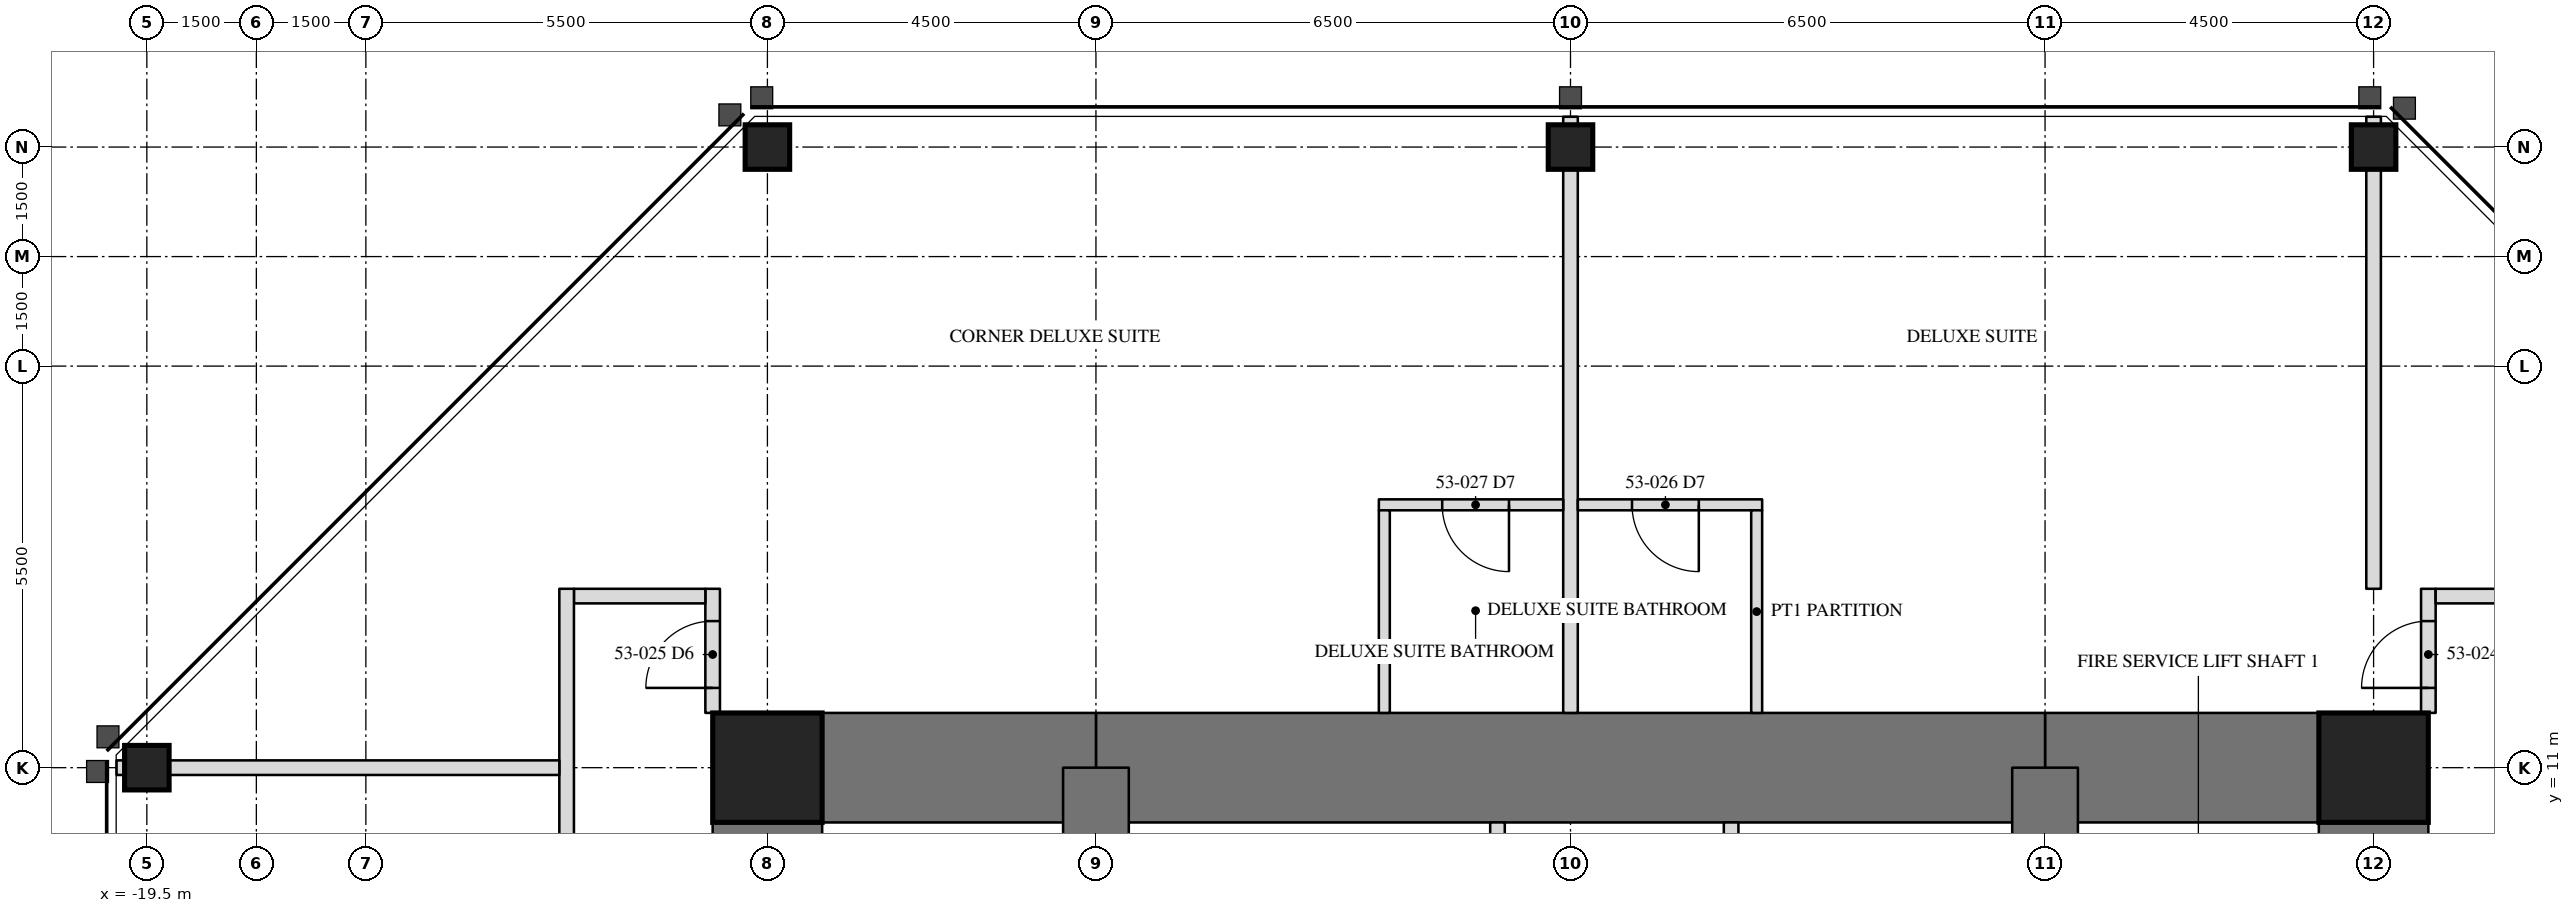
"""IFC4 building model, lengths in metres.
Left out: names, types, materials, properties, quantities, classifications, styles, units other than length and angle.
Written with IfcOpenShell. Run it as: python <this file> out.ifc"""

import sys

from ifc_helpers import new_model, si_unit, direction, frame, frame_2d, origin, origin_2d, place, context, subcontext, project, spatial, rectangle, hollow_rectangle, extrude, element, fill, save


model = new_model("IFC4")
c1 = context("Model", 3, precision=1e-05, world=origin(), true_north=direction((0.0, 1.0)))
c2 = subcontext(c1, "Body", "Model", "MODEL_VIEW")
j1 = project(units=[si_unit("LENGTHUNIT", "METRE"), si_unit("PLANEANGLEUNIT", "RADIAN")], contexts=[c1])
p1 = place(None, origin())
s1 = spatial("IfcSite", under=j1, at=p1, CompositionType="ELEMENT")
p2 = place(p1, origin())
s2 = spatial("IfcBuilding", under=s1, at=p2, CompositionType="ELEMENT")
p3 = place(p2, frame((0.0, 0.0, 222.2)))
s3 = spatial("IfcBuildingStorey", under=s2, at=p3, CompositionType="ELEMENT", Elevation=222.2)
for number, where, z_axis, x_axis in (
    (1, (11.0, 19.5, 0.0), (0.0, 0.0, 1.0), (1.0, 0.0, 0.0)),
    (2, (0.0, 19.5, 0.0), (0.0, 0.0, 1.0), (1.0, 0.0, 0.0)),
    (3, (-11.0, 19.5, 0.0), (0.0, 0.0, 1.0), (1.0, 0.0, 0.0)),
    (4, (-19.5, 11.0, 0.0), (0.0, 0.0, 1.0), (0.0, 1.0, 0.0)),
):
    element("IfcColumn", number, at=place(p3, frame(where, z_axis=z_axis, x_axis=x_axis)), inside=s3, PredefinedType="COLUMN", context=c2, shape_type="SweptSolid", body=[
        extrude(hollow_rectangle(XDim=0.61, YDim=0.61, WallThickness=0.076, at=origin_2d()), origin(), (0.0, 0.0, 1.0), 3.5),
    ])
p4 = place(p3, frame((11.0, -11.0, 0.0), z_axis=(0.0, 0.0, 1.0), x_axis=(0.0, 1.0, 0.0)))
e5 = element("IfcWall", 5, at=p4, inside=s3, PredefinedType="SHEAR", context=c2, shape_type="SweptSolid", body=[
    extrude(rectangle(XDim=22.0, YDim=1.5, at=frame_2d((11.0, 0.0))), origin(), (0.0, 0.0, 1.0), 3.5),
])
p5 = place(p4, frame((15.393, 0.0, 0.0)))
e6 = element("IfcOpeningElement", 6, at=p5, cuts=e5, PredefinedType="OPENING", context=c2, shape_type="SweptSolid", body=[
    extrude(rectangle(XDim=0.915, YDim=2.134, at=frame_2d((0.458, 1.067))), frame((0.0, 0.76, 0.0), z_axis=(0.0, -1.0, 0.0), x_axis=(1.0, 0.0, 0.0)), (0.0, 0.0, 1.0), 1.52),
])
p6 = place(p3, frame((-11.0, 11.0, 0.0), z_axis=(0.0, 0.0, 1.0), x_axis=(0.0, -1.0, 0.0)))
e7 = element("IfcWall", 7, at=p6, inside=s3, PredefinedType="SHEAR", context=c2, shape_type="SweptSolid", body=[
    extrude(rectangle(XDim=22.0, YDim=1.5, at=frame_2d((11.0, 0.0))), origin(), (0.0, 0.0, 1.0), 3.5),
])
p7 = place(p6, frame((15.393, 0.0, 0.0)))
e8 = element("IfcOpeningElement", 8, at=p7, cuts=e7, PredefinedType="OPENING", context=c2, shape_type="SweptSolid", body=[
    extrude(rectangle(XDim=0.915, YDim=2.134, at=frame_2d((0.458, 1.067))), frame((0.0, 0.76, 0.0), z_axis=(0.0, -1.0, 0.0), x_axis=(1.0, 0.0, 0.0)), (0.0, 0.0, 1.0), 1.52),
])
p8 = place(p3, frame((11.0, 11.0, 0.0), z_axis=(0.0, 0.0, 1.0), x_axis=(-1.0, 0.0, 0.0)))
e9 = element("IfcWall", 9, at=p8, inside=s3, PredefinedType="SHEAR", context=c2, shape_type="SweptSolid", body=[
    extrude(rectangle(XDim=4.5, YDim=1.5, at=frame_2d((2.25, 0.0))), origin(), (0.0, 0.0, 1.0), 3.5),
])
p9 = place(p3, frame((6.5, 11.0, 0.0), z_axis=(0.0, 0.0, 1.0), x_axis=(-1.0, 0.0, 0.0)))
e10 = element("IfcWall", 10, at=p9, inside=s3, PredefinedType="SHEAR", context=c2, shape_type="SweptSolid", body=[
    extrude(rectangle(XDim=13.0, YDim=1.5, at=frame_2d((6.5, 0.0))), origin(), (0.0, 0.0, 1.0), 3.5),
])
p10 = place(p3, frame((-6.5, 11.0, 0.0), z_axis=(0.0, 0.0, 1.0), x_axis=(-1.0, 0.0, 0.0)))
e11 = element("IfcWall", 11, at=p10, inside=s3, PredefinedType="SHEAR", context=c2, shape_type="SweptSolid", body=[
    extrude(rectangle(XDim=4.5, YDim=1.5, at=frame_2d((2.25, 0.0))), origin(), (0.0, 0.0, 1.0), 3.5),
])
for number, where, z_axis, x_axis in (
    (12, (6.5, 6.5, 0.0), (0.0, 0.0, 1.0), (0.0, 1.0, 0.0)),
    (13, (-6.5, 11.0, 0.0), (0.0, 0.0, 1.0), (0.0, -1.0, 0.0)),
):
    element("IfcWall", number, at=place(p3, frame(where, z_axis=z_axis, x_axis=x_axis)), inside=s3, PredefinedType="SHEAR", context=c2, shape_type="SweptSolid", body=[
        extrude(rectangle(XDim=4.5, YDim=0.9, at=frame_2d((2.25, 0.0))), origin(), (0.0, 0.0, 1.0), 3.5),
    ])
for number, where, z_axis, x_axis in (
    (14, (11.0, 11.0, 0.0), (0.0, 0.0, 1.0), (1.0, 0.0, 0.0)),
    (15, (-11.0, 11.0, 0.0), (0.0, 0.0, 1.0), (1.0, 0.0, 0.0)),
):
    element("IfcColumn", number, at=place(p3, frame(where, z_axis=z_axis, x_axis=x_axis)), inside=s3, PredefinedType="COLUMN", context=c2, shape_type="SweptSolid", body=[
        extrude(hollow_rectangle(XDim=1.499, YDim=1.499, WallThickness=0.102, at=origin_2d()), origin(), (0.0, 0.0, 1.0), 3.5),
    ])
p11 = place(p3, frame((-1.0, 6.95, 0.0), z_axis=(0.0, 0.0, 1.0), x_axis=(0.0, 1.0, 0.0)))
e16 = element("IfcWall", 16, at=p11, inside=s3, PredefinedType="PARTITIONING", context=c2, shape_type="SweptSolid", body=[
    extrude(rectangle(XDim=3.3, YDim=0.2, at=frame_2d((1.65, 0.0))), origin(), (0.0, 0.0, 1.0), 3.31),
])
p12 = place(p11, frame((1.192, 0.0, 0.0)))
e17 = element("IfcOpeningElement", 17, at=p12, cuts=e16, PredefinedType="OPENING", context=c2, shape_type="SweptSolid", body=[
    extrude(rectangle(XDim=0.915, YDim=2.134, at=frame_2d((0.458, 1.067))), frame((0.0, 0.11, 0.0), z_axis=(0.0, -1.0, 0.0), x_axis=(1.0, 0.0, 0.0)), (0.0, 0.0, 1.0), 0.22),
])
p13 = place(p3, frame((2.2, 6.95, 0.0), z_axis=(0.0, 0.0, 1.0), x_axis=(0.0, 1.0, 0.0)))
e18 = element("IfcWall", 18, at=p13, inside=s3, PredefinedType="PARTITIONING", context=c2, shape_type="SweptSolid", body=[
    extrude(rectangle(XDim=3.3, YDim=0.2, at=frame_2d((1.65, 0.0))), origin(), (0.0, 0.0, 1.0), 3.31),
])
p14 = place(p13, frame((1.192, 0.0, 0.0)))
e19 = element("IfcOpeningElement", 19, at=p14, cuts=e18, PredefinedType="OPENING", context=c2, shape_type="SweptSolid", body=[
    extrude(rectangle(XDim=0.915, YDim=2.134, at=frame_2d((0.458, 1.067))), frame((0.0, 0.11, 0.0), z_axis=(0.0, -1.0, 0.0), x_axis=(1.0, 0.0, 0.0)), (0.0, 0.0, 1.0), 0.22),
])
p15 = place(p3, frame((11.75, 11.75, 0.0), z_axis=(0.0, 0.0, 1.0), x_axis=(0.0, 1.0, 0.0)))
e20 = element("IfcWall", 20, at=p15, inside=s3, PredefinedType="PARTITIONING", context=c2, shape_type="SweptSolid", body=[
    extrude(rectangle(XDim=1.7, YDim=0.2, at=frame_2d((0.85, 0.0))), origin(), (0.0, 0.0, 1.0), 3.31),
])
p16 = place(p15, frame((0.343, 0.0, 0.0)))
e21 = element("IfcOpeningElement", 21, at=p16, cuts=e20, PredefinedType="OPENING", context=c2, shape_type="SweptSolid", body=[
    extrude(rectangle(XDim=0.915, YDim=2.134, at=frame_2d((0.458, 1.067))), frame((0.0, 0.11, 0.0), z_axis=(0.0, -1.0, 0.0), x_axis=(1.0, 0.0, 0.0)), (0.0, 0.0, 1.0), 0.22),
])
p17 = place(p3, frame((-11.75, 11.75, 0.0), z_axis=(0.0, 0.0, 1.0), x_axis=(0.0, 1.0, 0.0)))
e22 = element("IfcWall", 22, at=p17, inside=s3, PredefinedType="PARTITIONING", context=c2, shape_type="SweptSolid", body=[
    extrude(rectangle(XDim=1.7, YDim=0.2, at=frame_2d((0.85, 0.0))), origin(), (0.0, 0.0, 1.0), 3.31),
])
p18 = place(p17, frame((0.343, 0.0, 0.0)))
e23 = element("IfcOpeningElement", 23, at=p18, cuts=e22, PredefinedType="OPENING", context=c2, shape_type="SweptSolid", body=[
    extrude(rectangle(XDim=0.915, YDim=2.134, at=frame_2d((0.458, 1.067))), frame((0.0, 0.11, 0.0), z_axis=(0.0, -1.0, 0.0), x_axis=(1.0, 0.0, 0.0)), (0.0, 0.0, 1.0), 0.22),
])
p19 = place(p3, frame((13.85, 13.35, 0.0), z_axis=(0.0, 0.0, 1.0), x_axis=(-1.0, 0.0, 0.0)))
e24 = element("IfcWall", 24, at=p19, inside=s3, PredefinedType="PARTITIONING", context=c2, shape_type="SweptSolid", body=[
    extrude(rectangle(XDim=2.0, YDim=0.2, at=frame_2d((1.0, 0.0))), origin(), (0.0, 0.0, 1.0), 3.31),
])
p20 = place(p3, frame((-11.85, 13.35, 0.0), z_axis=(0.0, 0.0, 1.0), x_axis=(-1.0, 0.0, 0.0)))
e25 = element("IfcWall", 25, at=p20, inside=s3, PredefinedType="PARTITIONING", context=c2, shape_type="SweptSolid", body=[
    extrude(rectangle(XDim=1.8, YDim=0.2, at=frame_2d((0.9, 0.0))), origin(), (0.0, 0.0, 1.0), 3.31),
])
p21 = place(p3, frame((-13.75, 13.45, 0.0), z_axis=(0.0, 0.0, 1.0), x_axis=(0.0, -1.0, 0.0)))
e26 = element("IfcWall", 26, at=p21, inside=s3, PredefinedType="PARTITIONING", context=c2, shape_type="SweptSolid", body=[
    extrude(rectangle(XDim=26.7, YDim=0.2, at=frame_2d((13.35, 0.0))), origin(), (0.0, 0.0, 1.0), 3.31),
])
p22 = place(p21, frame((4.684, 0.0, 0.0)))
e27 = element("IfcOpeningElement", 27, at=p22, cuts=e26, PredefinedType="OPENING", context=c2, shape_type="SweptSolid", body=[
    extrude(rectangle(XDim=0.915, YDim=2.134, at=frame_2d((0.458, 1.067))), frame((0.0, 0.11, 0.0), z_axis=(0.0, -1.0, 0.0), x_axis=(1.0, 0.0, 0.0)), (0.0, 0.0, 1.0), 0.22),
])
p23 = place(p21, frame((10.204, 0.0, 0.0)))
e28 = element("IfcOpeningElement", 28, at=p23, cuts=e26, PredefinedType="OPENING", context=c2, shape_type="SweptSolid", body=[
    extrude(rectangle(XDim=0.915, YDim=2.134, at=frame_2d((0.458, 1.067))), frame((0.0, 0.11, 0.0), z_axis=(0.0, -1.0, 0.0), x_axis=(1.0, 0.0, 0.0)), (0.0, 0.0, 1.0), 0.22),
])
p24 = place(p21, frame((15.846, 0.0, 0.0)))
e29 = element("IfcOpeningElement", 29, at=p24, cuts=e26, PredefinedType="OPENING", context=c2, shape_type="SweptSolid", body=[
    extrude(rectangle(XDim=0.915, YDim=2.134, at=frame_2d((0.458, 1.067))), frame((0.0, 0.11, 0.0), z_axis=(0.0, -1.0, 0.0), x_axis=(1.0, 0.0, 0.0)), (0.0, 0.0, 1.0), 0.22),
])
p25 = place(p21, frame((21.366, 0.0, 0.0)))
e30 = element("IfcOpeningElement", 30, at=p25, cuts=e26, PredefinedType="OPENING", context=c2, shape_type="SweptSolid", body=[
    extrude(rectangle(XDim=0.915, YDim=2.134, at=frame_2d((0.458, 1.067))), frame((0.0, 0.11, 0.0), z_axis=(0.0, -1.0, 0.0), x_axis=(1.0, 0.0, 0.0)), (0.0, 0.0, 1.0), 0.22),
])
p26 = place(p3, frame((11.0, 13.45, 0.0), z_axis=(0.0, 0.0, 1.0), x_axis=(0.0, 1.0, 0.0)))
e31 = element("IfcWall", 31, at=p26, inside=s3, PredefinedType="PARTITIONING", context=c2, shape_type="SweptSolid", body=[
    extrude(rectangle(XDim=6.465, YDim=0.2, at=frame_2d((3.232, 0.0))), origin(), (0.0, 0.0, 1.0), 2.802),
])
p27 = place(p3, frame((0.0, 11.75, 0.0), z_axis=(0.0, 0.0, 1.0), x_axis=(0.0, 1.0, 0.0)))
e32 = element("IfcWall", 32, at=p27, inside=s3, PredefinedType="PARTITIONING", context=c2, shape_type="SweptSolid", body=[
    extrude(rectangle(XDim=8.165, YDim=0.2, at=frame_2d((4.083, 0.0))), origin(), (0.0, 0.0, 1.0), 2.802),
])
p28 = place(p3, frame((2.625, 14.6, 0.0), z_axis=(0.0, 0.0, 1.0), x_axis=(-1.0, 0.0, 0.0)))
e33 = element("IfcWall", 33, at=p28, inside=s3, PredefinedType="PARTITIONING", context=c2, shape_type="SweptSolid", body=[
    extrude(rectangle(XDim=2.525, YDim=0.15, at=frame_2d((1.262, 0.0))), origin(), (0.0, 0.0, 1.0), 3.31),
])
p29 = place(p28, frame((0.867, 0.0, 0.0)))
e34 = element("IfcOpeningElement", 34, at=p29, cuts=e33, PredefinedType="OPENING", context=c2, shape_type="SweptSolid", body=[
    extrude(rectangle(XDim=0.915, YDim=2.032, at=frame_2d((0.458, 1.016))), frame((0.0, 0.085, 0.0), z_axis=(0.0, -1.0, 0.0), x_axis=(1.0, 0.0, 0.0)), (0.0, 0.0, 1.0), 0.17),
])
p30 = place(p3, frame((2.55, 11.75, 0.0), z_axis=(0.0, 0.0, 1.0), x_axis=(0.0, 1.0, 0.0)))
e35 = element("IfcWall", 35, at=p30, inside=s3, PredefinedType="PARTITIONING", context=c2, shape_type="SweptSolid", body=[
    extrude(rectangle(XDim=2.775, YDim=0.15, at=frame_2d((1.387, 0.0))), origin(), (0.0, 0.0, 1.0), 3.31),
])
p31 = place(p3, frame((-0.1, 14.6, 0.0), z_axis=(0.0, 0.0, 1.0), x_axis=(-1.0, 0.0, 0.0)))
e36 = element("IfcWall", 36, at=p31, inside=s3, PredefinedType="PARTITIONING", context=c2, shape_type="SweptSolid", body=[
    extrude(rectangle(XDim=2.525, YDim=0.15, at=frame_2d((1.262, 0.0))), origin(), (0.0, 0.0, 1.0), 3.31),
])
p32 = place(p31, frame((0.742, 0.0, 0.0)))
e37 = element("IfcOpeningElement", 37, at=p32, cuts=e36, PredefinedType="OPENING", context=c2, shape_type="SweptSolid", body=[
    extrude(rectangle(XDim=0.915, YDim=2.032, at=frame_2d((0.458, 1.016))), frame((0.0, 0.085, 0.0), z_axis=(0.0, -1.0, 0.0), x_axis=(1.0, 0.0, 0.0)), (0.0, 0.0, 1.0), 0.17),
])
p33 = place(p3, frame((-2.55, 11.75, 0.0), z_axis=(0.0, 0.0, 1.0), x_axis=(0.0, 1.0, 0.0)))
e38 = element("IfcWall", 38, at=p33, inside=s3, PredefinedType="PARTITIONING", context=c2, shape_type="SweptSolid", body=[
    extrude(rectangle(XDim=2.775, YDim=0.15, at=frame_2d((1.387, 0.0))), origin(), (0.0, 0.0, 1.0), 3.31),
])
p34 = place(p3, frame((-13.85, 11.0, 0.0), z_axis=(0.0, 0.0, 1.0), x_axis=(-1.0, 0.0, 0.0)))
e39 = element("IfcWall", 39, at=p34, inside=s3, PredefinedType="PARTITIONING", context=c2, shape_type="SweptSolid", body=[
    extrude(rectangle(XDim=6.065, YDim=0.2, at=frame_2d((3.032, 0.0))), origin(), (0.0, 0.0, 1.0), 2.802),
])
p35 = place(p16, origin())
e40 = element("IfcDoor", 40, at=p35, inside=s3, OperationType="SINGLE_SWING_LEFT", PredefinedType="DOOR", context=c2, shape_type="SweptSolid", body=[
    extrude(rectangle(XDim=0.915, YDim=2.134, at=frame_2d((0.458, 1.067))), frame((0.0, 0.025, 0.0), z_axis=(0.0, -1.0, 0.0), x_axis=(1.0, 0.0, 0.0)), (0.0, 0.0, 1.0), 0.05),
])
fill(e21, e40)
p36 = place(p18, origin())
e41 = element("IfcDoor", 41, at=p36, inside=s3, OperationType="SINGLE_SWING_LEFT", PredefinedType="DOOR", context=c2, shape_type="SweptSolid", body=[
    extrude(rectangle(XDim=0.915, YDim=2.134, at=frame_2d((0.458, 1.067))), frame((0.0, 0.025, 0.0), z_axis=(0.0, -1.0, 0.0), x_axis=(1.0, 0.0, 0.0)), (0.0, 0.0, 1.0), 0.05),
])
fill(e23, e41)
p37 = place(p29, origin())
e42 = element("IfcDoor", 42, at=p37, inside=s3, OperationType="SINGLE_SWING_LEFT", PredefinedType="DOOR", context=c2, shape_type="SweptSolid", body=[
    extrude(rectangle(XDim=0.915, YDim=2.032, at=frame_2d((0.458, 1.016))), frame((0.0, 0.025, 0.0), z_axis=(0.0, -1.0, 0.0), x_axis=(1.0, 0.0, 0.0)), (0.0, 0.0, 1.0), 0.05),
])
fill(e34, e42)
p38 = place(p32, origin())
e43 = element("IfcDoor", 43, at=p38, inside=s3, OperationType="SINGLE_SWING_LEFT", PredefinedType="DOOR", context=c2, shape_type="SweptSolid", body=[
    extrude(rectangle(XDim=0.915, YDim=2.032, at=frame_2d((0.458, 1.016))), frame((0.0, 0.025, 0.0), z_axis=(0.0, -1.0, 0.0), x_axis=(1.0, 0.0, 0.0)), (0.0, 0.0, 1.0), 0.05),
])
fill(e37, e43)
save(model, sys.argv[1])
